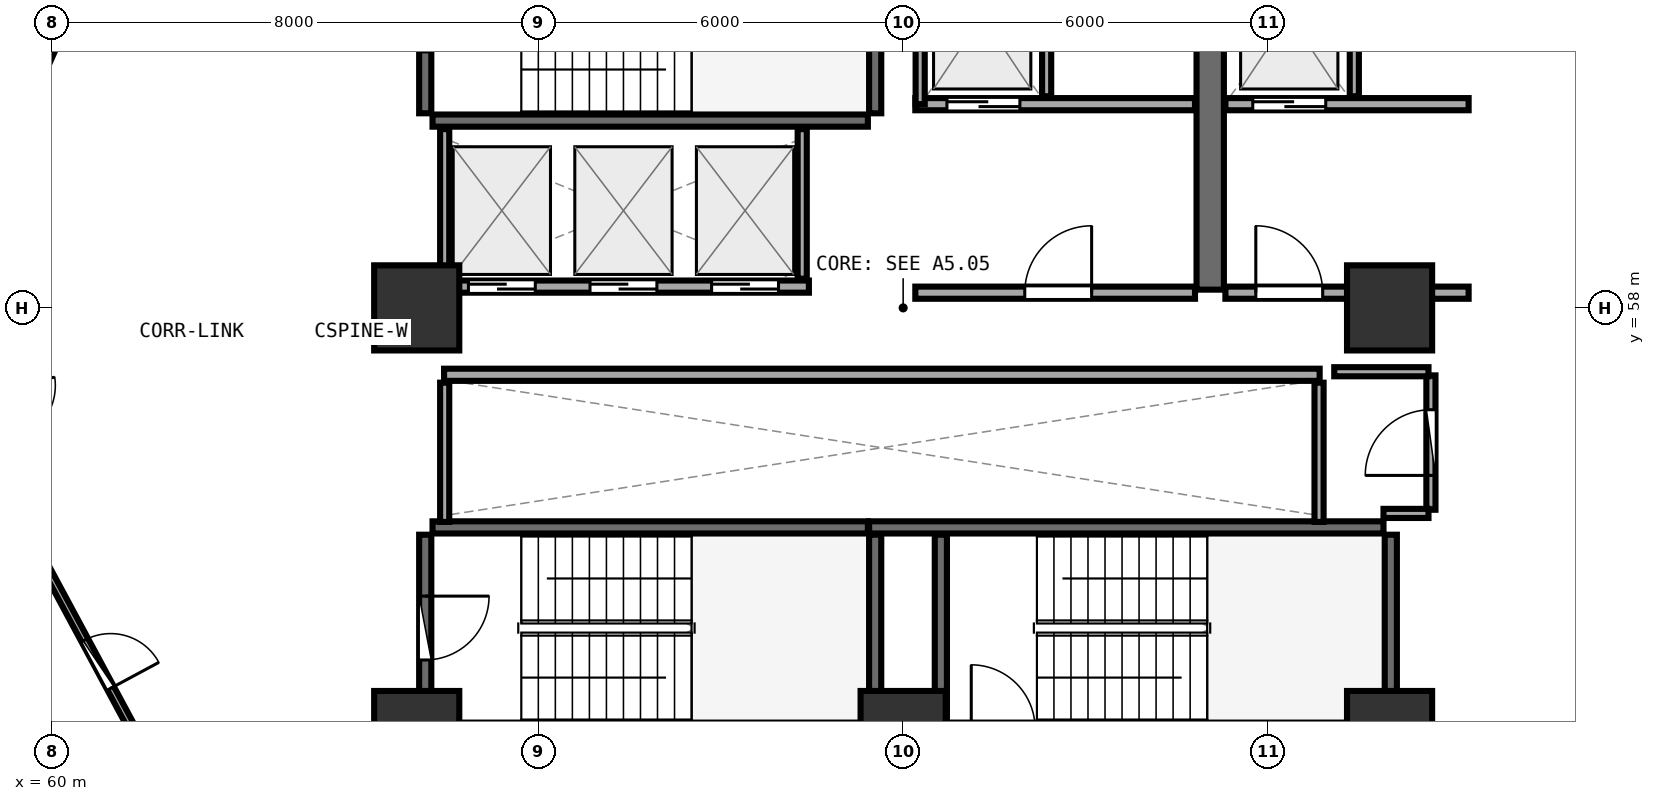
"""IFC4 building model, lengths in metres.
Left out: names, types, materials, properties, quantities, classifications, styles, units other than length and angle.
Written with IfcOpenShell. Run it as: python <this file> out.ifc"""

import sys

from ifc_helpers import new_model, si_unit, direction, frame, frame_2d, origin, origin_2d, place, context, subcontext, project, spatial, rectangle, extrude, element, fill, save


model = new_model("IFC4")
c1 = context("Model", 3, precision=1e-05, world=origin(), true_north=direction((0.0, 1.0)))
c2 = subcontext(c1, "Body", "Model", "MODEL_VIEW")
j1 = project(units=[si_unit("LENGTHUNIT", "METRE"), si_unit("PLANEANGLEUNIT", "RADIAN")], contexts=[c1])
p1 = place(None, origin())
s1 = spatial("IfcSite", under=j1, at=p1, CompositionType="ELEMENT")
p2 = place(p1, origin())
s2 = spatial("IfcBuilding", under=s1, at=p2, CompositionType="ELEMENT")
p3 = place(p2, frame((0.0, 0.0, 91.35)))
s3 = spatial("IfcBuildingStorey", under=s2, at=p3, CompositionType="ELEMENT", Elevation=91.35)
for number, where, z_axis, x_axis in (
    (1, (66.0, 51.0, 0.0), (0.0, 0.0, 1.0), (1.0, 0.0, 0.0)),
    (2, (74.0, 51.0, 0.0), (0.0, 0.0, 1.0), (1.0, 0.0, 0.0)),
    (3, (82.0, 51.0, 0.0), (0.0, 0.0, 1.0), (1.0, 0.0, 0.0)),
    (4, (82.0, 58.0, 0.0), (0.0, 0.0, 1.0), (1.0, 0.0, 0.0)),
    (5, (66.0, 58.0, 0.0), (0.0, 0.0, 1.0), (1.0, 0.0, 0.0)),
):
    element("IfcColumn", number, at=place(p3, frame(where, z_axis=z_axis, x_axis=x_axis)), inside=s3, PredefinedType="PILASTER", context=c2, shape_type="SweptSolid", body=[
        extrude(rectangle(XDim=1.4, YDim=1.4, at=origin_2d()), origin(), (0.0, 0.0, 1.0), 3.75),
    ])
p4 = place(p3, frame((66.26, 61.08, 0.0), z_axis=(0.0, 0.0, 1.0), x_axis=(1.0, 0.0, 0.0)))
e6 = element("IfcWall", 6, at=p4, inside=s3, PredefinedType="SHEAR", context=c2, shape_type="SweptSolid", body=[
    extrude(rectangle(XDim=7.16, YDim=0.2, at=frame_2d((3.58, 0.0))), origin(), (0.0, 0.0, 1.0), 3.49),
])
p5 = place(p3, frame((73.54, 61.2, 0.0), z_axis=(0.0, 0.0, 1.0), x_axis=(0.0, 1.0, 0.0)))
e7 = element("IfcWall", 7, at=p5, inside=s3, PredefinedType="SHEAR", context=c2, shape_type="SweptSolid", body=[
    extrude(rectangle(XDim=3.07, YDim=0.2, at=frame_2d((1.535, 0.0))), origin(), (0.0, 0.0, 1.0), 3.49),
])
p6 = place(p3, frame((66.14, 64.27, 0.0), z_axis=(0.0, 0.0, 1.0), x_axis=(0.0, -1.0, 0.0)))
e8 = element("IfcWall", 8, at=p6, inside=s3, PredefinedType="SHEAR", context=c2, shape_type="SweptSolid", body=[
    extrude(rectangle(XDim=3.07, YDim=0.2, at=frame_2d((1.535, 0.0))), origin(), (0.0, 0.0, 1.0), 3.49),
])
p7 = place(p6, frame((1.01, 0.0, 0.0)))
e9 = element("IfcOpeningElement", 9, at=p7, cuts=e8, PredefinedType="OPENING", context=c2, shape_type="SweptSolid", body=[
    extrude(rectangle(XDim=1.05, YDim=2.1, at=frame_2d((0.525, 1.05))), frame((0.0, 0.11, 0.0), z_axis=(0.0, -1.0, 0.0), x_axis=(1.0, 0.0, 0.0)), (0.0, 0.0, 1.0), 0.22),
])
p8 = place(p3, frame((82.02, 51.2, 0.0), z_axis=(0.0, 0.0, 1.0), x_axis=(0.0, 1.0, 0.0)))
e10 = element("IfcWall", 10, at=p8, inside=s3, PredefinedType="SHEAR", context=c2, shape_type="SweptSolid", body=[
    extrude(rectangle(XDim=3.07, YDim=0.2, at=frame_2d((1.535, 0.0))), origin(), (0.0, 0.0, 1.0), 3.49),
])
p9 = place(p3, frame((81.9, 54.39, 0.0), z_axis=(0.0, 0.0, 1.0), x_axis=(-1.0, 0.0, 0.0)))
e11 = element("IfcWall", 11, at=p9, inside=s3, PredefinedType="SHEAR", context=c2, shape_type="SweptSolid", body=[
    extrude(rectangle(XDim=8.46, YDim=0.2, at=frame_2d((4.23, 0.0))), origin(), (0.0, 0.0, 1.0), 3.49),
])
for number, where, z_axis, x_axis in (
    (12, (74.62, 54.27, 0.0), (0.0, 0.0, 1.0), (0.0, -1.0, 0.0)),
    (13, (73.54, 51.2, 0.0), (0.0, 0.0, 1.0), (0.0, 1.0, 0.0)),
):
    element("IfcWall", number, at=place(p3, frame(where, z_axis=z_axis, x_axis=x_axis)), inside=s3, PredefinedType="SHEAR", context=c2, shape_type="SweptSolid", body=[
        extrude(rectangle(XDim=3.07, YDim=0.2, at=frame_2d((1.535, 0.0))), origin(), (0.0, 0.0, 1.0), 3.49),
    ])
p10 = place(p3, frame((73.42, 54.39, 0.0), z_axis=(0.0, 0.0, 1.0), x_axis=(-1.0, 0.0, 0.0)))
e14 = element("IfcWall", 14, at=p10, inside=s3, PredefinedType="SHEAR", context=c2, shape_type="SweptSolid", body=[
    extrude(rectangle(XDim=7.16, YDim=0.2, at=frame_2d((3.58, 0.0))), origin(), (0.0, 0.0, 1.0), 3.49),
])
p11 = place(p3, frame((66.14, 54.27, 0.0), z_axis=(0.0, 0.0, 1.0), x_axis=(0.0, -1.0, 0.0)))
e15 = element("IfcWall", 15, at=p11, inside=s3, PredefinedType="SHEAR", context=c2, shape_type="SweptSolid", body=[
    extrude(rectangle(XDim=3.07, YDim=0.2, at=frame_2d((1.535, 0.0))), origin(), (0.0, 0.0, 1.0), 3.49),
])
p12 = place(p11, frame((1.01, 0.0, 0.0)))
e16 = element("IfcOpeningElement", 16, at=p12, cuts=e15, PredefinedType="OPENING", context=c2, shape_type="SweptSolid", body=[
    extrude(rectangle(XDim=1.05, YDim=2.1, at=frame_2d((0.525, 1.05))), frame((0.0, 0.11, 0.0), z_axis=(0.0, -1.0, 0.0), x_axis=(1.0, 0.0, 0.0)), (0.0, 0.0, 1.0), 0.22),
])
p13 = place(p3, frame((79.05, 58.3, 0.0), z_axis=(0.0, 0.0, 1.0), x_axis=(0.0, 1.0, 0.0)))
e17 = element("IfcWall", 17, at=p13, inside=s3, PredefinedType="SHEAR", context=c2, shape_type="SweptSolid", body=[
    extrude(rectangle(XDim=6.3, YDim=0.45, at=frame_2d((3.15, 0.0))), origin(), (0.0, 0.0, 1.0), 3.49),
])
p14 = place(p3, frame((74.2, 61.35, 0.0), z_axis=(0.0, 0.0, 1.0), x_axis=(1.0, 0.0, 0.0)))
e18 = element("IfcWall", 18, at=p14, inside=s3, PredefinedType="SOLIDWALL", context=c2, shape_type="SweptSolid", body=[
    extrude(rectangle(XDim=4.6, YDim=0.2, at=frame_2d((2.3, 0.0))), origin(), (0.0, 0.0, 1.0), 3.48),
])
p15 = place(p14, frame((0.52, 0.0, 0.0)))
e19 = element("IfcOpeningElement", 19, at=p15, cuts=e18, PredefinedType="OPENING", context=c2, shape_type="SweptSolid", body=[
    extrude(rectangle(XDim=1.2, YDim=2.15, at=frame_2d((0.6, 1.075))), frame((0.0, 0.11, 0.0), z_axis=(0.0, -1.0, 0.0), x_axis=(1.0, 0.0, 0.0)), (0.0, 0.0, 1.0), 0.22),
])
p16 = place(p3, frame((74.28, 61.35, 0.0), z_axis=(0.0, 0.0, 1.0), x_axis=(0.0, 1.0, 0.0)))
e20 = element("IfcWall", 20, at=p16, inside=s3, PredefinedType="PARTITIONING", context=c2, shape_type="SweptSolid", body=[
    extrude(rectangle(XDim=2.97, YDim=0.15, at=frame_2d((1.485, 0.0))), origin(), (0.0, 0.0, 1.0), 3.48),
])
p17 = place(p3, frame((76.36, 61.48, 0.0), z_axis=(0.0, 0.0, 1.0), x_axis=(0.0, 1.0, 0.0)))
e21 = element("IfcWall", 21, at=p17, inside=s3, PredefinedType="PARTITIONING", context=c2, shape_type="SweptSolid", body=[
    extrude(rectangle(XDim=2.84, YDim=0.15, at=frame_2d((1.42, 0.0))), origin(), (0.0, 0.0, 1.0), 3.48),
])
p18 = place(p3, frame((79.3, 61.35, 0.0), z_axis=(0.0, 0.0, 1.0), x_axis=(1.0, 0.0, 0.0)))
e22 = element("IfcWall", 22, at=p18, inside=s3, PredefinedType="SOLIDWALL", context=c2, shape_type="SweptSolid", body=[
    extrude(rectangle(XDim=4.0, YDim=0.2, at=frame_2d((2.0, 0.0))), origin(), (0.0, 0.0, 1.0), 2.775),
])
p19 = place(p18, frame((0.45, 0.0, 0.0)))
e23 = element("IfcOpeningElement", 23, at=p19, cuts=e22, PredefinedType="OPENING", context=c2, shape_type="SweptSolid", body=[
    extrude(rectangle(XDim=1.2, YDim=2.15, at=frame_2d((0.6, 1.075))), frame((0.0, 0.11, 0.0), z_axis=(0.0, -1.0, 0.0), x_axis=(1.0, 0.0, 0.0)), (0.0, 0.0, 1.0), 0.22),
])
p20 = place(p3, frame((81.42, 61.48, 0.0), z_axis=(0.0, 0.0, 1.0), x_axis=(0.0, 1.0, 0.0)))
e24 = element("IfcWall", 24, at=p20, inside=s3, PredefinedType="PARTITIONING", context=c2, shape_type="SweptSolid", body=[
    extrude(rectangle(XDim=2.84, YDim=0.15, at=frame_2d((1.42, 0.0))), origin(), (0.0, 0.0, 1.0), 3.48),
])
p21 = place(p3, frame((74.2, 58.25, 0.0), z_axis=(0.0, 0.0, 1.0), x_axis=(1.0, 0.0, 0.0)))
e25 = element("IfcWall", 25, at=p21, inside=s3, PredefinedType="SOLIDWALL", context=c2, shape_type="SweptSolid", body=[
    extrude(rectangle(XDim=4.6, YDim=0.2, at=frame_2d((2.3, 0.0))), origin(), (0.0, 0.0, 1.0), 3.48),
])
p22 = place(p21, frame((1.8, 0.0, 0.0)))
e26 = element("IfcOpeningElement", 26, at=p22, cuts=e25, PredefinedType="OPENING", context=c2, shape_type="SweptSolid", body=[
    extrude(rectangle(XDim=1.1, YDim=2.1, at=frame_2d((0.55, 1.05))), frame((0.0, 0.11, 0.0), z_axis=(0.0, -1.0, 0.0), x_axis=(1.0, 0.0, 0.0)), (0.0, 0.0, 1.0), 0.22),
])
p23 = place(p3, frame((79.3, 58.25, 0.0), z_axis=(0.0, 0.0, 1.0), x_axis=(1.0, 0.0, 0.0)))
e27 = element("IfcWall", 27, at=p23, inside=s3, PredefinedType="SOLIDWALL", context=c2, shape_type="SweptSolid", body=[
    extrude(rectangle(XDim=4.0, YDim=0.2, at=frame_2d((2.0, 0.0))), origin(), (0.0, 0.0, 1.0), 2.775),
])
p24 = place(p23, frame((0.5, 0.0, 0.0)))
e28 = element("IfcOpeningElement", 28, at=p24, cuts=e27, PredefinedType="OPENING", context=c2, shape_type="SweptSolid", body=[
    extrude(rectangle(XDim=1.1, YDim=2.1, at=frame_2d((0.55, 1.05))), frame((0.0, 0.11, 0.0), z_axis=(0.0, -1.0, 0.0), x_axis=(1.0, 0.0, 0.0)), (0.0, 0.0, 1.0), 0.22),
])
p25 = place(p3, frame((66.45, 58.35, 0.0), z_axis=(0.0, 0.0, 1.0), x_axis=(1.0, 0.0, 0.0)))
e29 = element("IfcWall", 29, at=p25, inside=s3, PredefinedType="SOLIDWALL", context=c2, shape_type="SweptSolid", body=[
    extrude(rectangle(XDim=6.0, YDim=0.2, at=frame_2d((3.0, 0.0))), origin(), (0.0, 0.0, 1.0), 3.48),
])
p26 = place(p25, frame((0.4, 0.0, 0.0)))
e30 = element("IfcOpeningElement", 30, at=p26, cuts=e29, PredefinedType="OPENING", context=c2, shape_type="SweptSolid", body=[
    extrude(rectangle(XDim=1.1, YDim=2.1, at=frame_2d((0.55, 1.05))), frame((0.0, 0.11, 0.0), z_axis=(0.0, -1.0, 0.0), x_axis=(1.0, 0.0, 0.0)), (0.0, 0.0, 1.0), 0.22),
])
p27 = place(p25, frame((2.4, 0.0, 0.0)))
e31 = element("IfcOpeningElement", 31, at=p27, cuts=e29, PredefinedType="OPENING", context=c2, shape_type="SweptSolid", body=[
    extrude(rectangle(XDim=1.1, YDim=2.1, at=frame_2d((0.55, 1.05))), frame((0.0, 0.11, 0.0), z_axis=(0.0, -1.0, 0.0), x_axis=(1.0, 0.0, 0.0)), (0.0, 0.0, 1.0), 0.22),
])
p28 = place(p25, frame((4.4, 0.0, 0.0)))
e32 = element("IfcOpeningElement", 32, at=p28, cuts=e29, PredefinedType="OPENING", context=c2, shape_type="SweptSolid", body=[
    extrude(rectangle(XDim=1.1, YDim=2.1, at=frame_2d((0.55, 1.05))), frame((0.0, 0.11, 0.0), z_axis=(0.0, -1.0, 0.0), x_axis=(1.0, 0.0, 0.0)), (0.0, 0.0, 1.0), 0.22),
])
for number, where, z_axis, x_axis in (
    (33, (66.46, 58.48, 0.0), (0.0, 0.0, 1.0), (0.0, 1.0, 0.0)),
    (34, (72.34, 58.48, 0.0), (0.0, 0.0, 1.0), (0.0, 1.0, 0.0)),
):
    element("IfcWall", number, at=place(p3, frame(where, z_axis=z_axis, x_axis=x_axis)), inside=s3, PredefinedType="PARTITIONING", context=c2, shape_type="SweptSolid", body=[
        extrude(rectangle(XDim=2.46, YDim=0.15, at=frame_2d((1.23, 0.0))), origin(), (0.0, 0.0, 1.0), 3.48),
    ])
p29 = place(p3, frame((66.45, 56.9, 0.0), z_axis=(0.0, 0.0, 1.0), x_axis=(1.0, 0.0, 0.0)))
e35 = element("IfcWall", 35, at=p29, inside=s3, PredefinedType="SOLIDWALL", context=c2, shape_type="SweptSolid", body=[
    extrude(rectangle(XDim=14.4, YDim=0.2, at=frame_2d((7.2, 0.0))), origin(), (0.0, 0.0, 1.0), 3.48),
])
for number, where, z_axis, x_axis in (
    (36, (66.46, 54.48, 0.0), (0.0, 0.0, 1.0), (0.0, 1.0, 0.0)),
    (37, (80.84, 54.48, 0.0), (0.0, 0.0, 1.0), (0.0, 1.0, 0.0)),
):
    element("IfcWall", number, at=place(p3, frame(where, z_axis=z_axis, x_axis=x_axis)), inside=s3, PredefinedType="PARTITIONING", context=c2, shape_type="SweptSolid", body=[
        extrude(rectangle(XDim=2.29, YDim=0.15, at=frame_2d((1.145, 0.0))), origin(), (0.0, 0.0, 1.0), 3.48),
    ])
p30 = place(p3, frame((82.68, 54.68, 0.0), z_axis=(0.0, 0.0, 1.0), x_axis=(0.0, 1.0, 0.0)))
e38 = element("IfcWall", 38, at=p30, inside=s3, PredefinedType="PARTITIONING", context=c2, shape_type="SweptSolid", body=[
    extrude(rectangle(XDim=2.21, YDim=0.15, at=frame_2d((1.105, 0.0))), origin(), (0.0, 0.0, 1.0), 3.48),
])
p31 = place(p30, frame((0.565, 0.0, 0.0)))
e39 = element("IfcOpeningElement", 39, at=p31, cuts=e38, PredefinedType="OPENING", context=c2, shape_type="SweptSolid", body=[
    extrude(rectangle(XDim=1.08, YDim=2.1, at=frame_2d((0.54, 1.05))), frame((0.0, 0.085, 0.0), z_axis=(0.0, -1.0, 0.0), x_axis=(1.0, 0.0, 0.0)), (0.0, 0.0, 1.0), 0.17),
])
p32 = place(p3, frame((61.414, 65.428, 0.0), z_axis=(0.0, 0.0, 1.0), x_axis=(-0.407078232177, -0.913393295841, 0.0)))
e40 = element("IfcWall", 40, at=p32, inside=s3, PredefinedType="PARTITIONING", context=c2, shape_type="SweptSolid", body=[
    extrude(rectangle(XDim=5.302, YDim=0.12, at=frame_2d((2.651, 0.0))), origin(), (0.0, 0.0, 1.0), 2.925),
])
p33 = place(p32, frame((2.201, 0.0, 0.0)))
e41 = element("IfcOpeningElement", 41, at=p33, cuts=e40, PredefinedType="OPENING", context=c2, shape_type="SweptSolid", body=[
    extrude(rectangle(XDim=0.9, YDim=2.08, at=frame_2d((0.45, 1.04))), frame((0.0, 0.07, 0.0), z_axis=(0.0, -1.0, 0.0), x_axis=(1.0, 0.0, 0.0)), (0.0, 0.0, 1.0), 0.14),
])
p34 = place(p3, frame((59.49, 54.488, 0.0), z_axis=(0.0, 0.0, 1.0), x_axis=(0.473630069111, -0.880723882743, 0.0)))
e42 = element("IfcWall", 42, at=p34, inside=s3, PredefinedType="PARTITIONING", context=c2, shape_type="SweptSolid", body=[
    extrude(rectangle(XDim=5.332, YDim=0.12, at=frame_2d((2.666, 0.0))), origin(), (0.0, 0.0, 1.0), 2.925),
])
p35 = place(p34, frame((2.216, 0.0, 0.0)))
e43 = element("IfcOpeningElement", 43, at=p35, cuts=e42, PredefinedType="OPENING", context=c2, shape_type="SweptSolid", body=[
    extrude(rectangle(XDim=0.9, YDim=2.08, at=frame_2d((0.45, 1.04))), frame((0.0, 0.07, 0.0), z_axis=(0.0, -1.0, 0.0), x_axis=(1.0, 0.0, 0.0)), (0.0, 0.0, 1.0), 0.14),
])
p36 = place(p3, frame((84.608, 48.36, 0.0), z_axis=(0.0, 0.0, 1.0), x_axis=(0.596833425992, 0.802365167251, 0.0)))
e44 = element("IfcWall", 44, at=p36, inside=s3, PredefinedType="PARTITIONING", context=c2, shape_type="SweptSolid", body=[
    extrude(rectangle(XDim=5.399, YDim=0.12, at=frame_2d((2.699, 0.0))), origin(), (0.0, 0.0, 1.0), 2.925),
])
p37 = place(p36, frame((2.249, 0.0, 0.0)))
e45 = element("IfcOpeningElement", 45, at=p37, cuts=e44, PredefinedType="OPENING", context=c2, shape_type="SweptSolid", body=[
    extrude(rectangle(XDim=0.9, YDim=2.08, at=frame_2d((0.45, 1.04))), frame((0.0, 0.07, 0.0), z_axis=(0.0, -1.0, 0.0), x_axis=(1.0, 0.0, 0.0)), (0.0, 0.0, 1.0), 0.14),
])
p38 = place(p3, frame((81.9, 54.62, 0.0), z_axis=(0.0, 0.0, 1.0), x_axis=(1.0, 0.0, 0.0)))
e46 = element("IfcWall", 46, at=p38, inside=s3, PredefinedType="PARTITIONING", context=c2, shape_type="SweptSolid", body=[
    extrude(rectangle(XDim=0.74, YDim=0.15, at=frame_2d((0.37, 0.0))), origin(), (0.0, 0.0, 1.0), 2.775),
])
p39 = place(p3, frame((82.64, 56.95, 0.0), z_axis=(0.0, 0.0, 1.0), x_axis=(-1.0, 0.0, 0.0)))
e47 = element("IfcWall", 47, at=p39, inside=s3, PredefinedType="PARTITIONING", context=c2, shape_type="SweptSolid", body=[
    extrude(rectangle(XDim=1.55, YDim=0.15, at=frame_2d((0.775, 0.0))), origin(), (0.0, 0.0, 1.0), 2.775),
])
p40 = place(p12, origin())
e48 = element("IfcDoor", 48, at=p40, inside=s3, OperationType="SINGLE_SWING_LEFT", PredefinedType="DOOR", context=c2, shape_type="SweptSolid", body=[
    extrude(rectangle(XDim=1.05, YDim=2.1, at=frame_2d((0.525, 1.05))), frame((0.0, 0.025, 0.0), z_axis=(0.0, -1.0, 0.0), x_axis=(1.0, 0.0, 0.0)), (0.0, 0.0, 1.0), 0.05),
])
fill(e16, e48)
p41 = place(p15, origin())
e49 = element("IfcDoor", 49, at=p41, inside=s3, OperationType="DOUBLE_DOOR_SLIDING", PredefinedType="DOOR", context=c2, shape_type="SweptSolid", body=[
    extrude(rectangle(XDim=1.2, YDim=2.15, at=frame_2d((0.6, 1.075))), frame((0.0, 0.025, 0.0), z_axis=(0.0, -1.0, 0.0), x_axis=(1.0, 0.0, 0.0)), (0.0, 0.0, 1.0), 0.05),
])
fill(e19, e49)
p42 = place(p19, origin())
e50 = element("IfcDoor", 50, at=p42, inside=s3, OperationType="DOUBLE_DOOR_SLIDING", PredefinedType="DOOR", context=c2, shape_type="SweptSolid", body=[
    extrude(rectangle(XDim=1.2, YDim=2.15, at=frame_2d((0.6, 1.075))), frame((0.0, 0.025, 0.0), z_axis=(0.0, -1.0, 0.0), x_axis=(1.0, 0.0, 0.0)), (0.0, 0.0, 1.0), 0.05),
])
fill(e23, e50)
p43 = place(p22, frame((1.1, 0.0, 0.0), z_axis=(0.0, 0.0, 1.0), x_axis=(-1.0, 0.0, 0.0)))
e51 = element("IfcDoor", 51, at=p43, inside=s3, OperationType="SINGLE_SWING_LEFT", PredefinedType="DOOR", context=c2, shape_type="SweptSolid", body=[
    extrude(rectangle(XDim=1.1, YDim=2.1, at=frame_2d((0.55, 1.05))), frame((0.0, 0.025, 0.0), z_axis=(0.0, -1.0, 0.0), x_axis=(1.0, 0.0, 0.0)), (0.0, 0.0, 1.0), 0.05),
])
fill(e26, e51)
p44 = place(p24, frame((1.1, 0.0, 0.0), z_axis=(0.0, 0.0, 1.0), x_axis=(-1.0, 0.0, 0.0)))
e52 = element("IfcDoor", 52, at=p44, inside=s3, OperationType="SINGLE_SWING_RIGHT", PredefinedType="DOOR", context=c2, shape_type="SweptSolid", body=[
    extrude(rectangle(XDim=1.1, YDim=2.1, at=frame_2d((0.55, 1.05))), frame((0.0, 0.025, 0.0), z_axis=(0.0, -1.0, 0.0), x_axis=(1.0, 0.0, 0.0)), (0.0, 0.0, 1.0), 0.05),
])
fill(e28, e52)
p45 = place(p26, origin())
e53 = element("IfcDoor", 53, at=p45, inside=s3, OperationType="DOUBLE_DOOR_SLIDING", PredefinedType="DOOR", context=c2, shape_type="SweptSolid", body=[
    extrude(rectangle(XDim=1.1, YDim=2.1, at=frame_2d((0.55, 1.05))), frame((0.0, 0.025, 0.0), z_axis=(0.0, -1.0, 0.0), x_axis=(1.0, 0.0, 0.0)), (0.0, 0.0, 1.0), 0.05),
])
fill(e30, e53)
p46 = place(p27, origin())
e54 = element("IfcDoor", 54, at=p46, inside=s3, OperationType="DOUBLE_DOOR_SLIDING", PredefinedType="DOOR", context=c2, shape_type="SweptSolid", body=[
    extrude(rectangle(XDim=1.1, YDim=2.1, at=frame_2d((0.55, 1.05))), frame((0.0, 0.025, 0.0), z_axis=(0.0, -1.0, 0.0), x_axis=(1.0, 0.0, 0.0)), (0.0, 0.0, 1.0), 0.05),
])
fill(e31, e54)
p47 = place(p28, origin())
e55 = element("IfcDoor", 55, at=p47, inside=s3, OperationType="DOUBLE_DOOR_SLIDING", PredefinedType="DOOR", context=c2, shape_type="SweptSolid", body=[
    extrude(rectangle(XDim=1.1, YDim=2.1, at=frame_2d((0.55, 1.05))), frame((0.0, 0.025, 0.0), z_axis=(0.0, -1.0, 0.0), x_axis=(1.0, 0.0, 0.0)), (0.0, 0.0, 1.0), 0.05),
])
fill(e32, e55)
p48 = place(p31, origin())
e56 = element("IfcDoor", 56, at=p48, inside=s3, OperationType="SINGLE_SWING_LEFT", PredefinedType="DOOR", context=c2, shape_type="SweptSolid", body=[
    extrude(rectangle(XDim=1.08, YDim=2.1, at=frame_2d((0.54, 1.05))), frame((0.0, 0.025, 0.0), z_axis=(0.0, -1.0, 0.0), x_axis=(1.0, 0.0, 0.0)), (0.0, 0.0, 1.0), 0.05),
])
fill(e39, e56)
p49 = place(p35, origin())
e57 = element("IfcDoor", 57, at=p49, inside=s3, OperationType="SINGLE_SWING_RIGHT", PredefinedType="DOOR", context=c2, shape_type="SweptSolid", body=[
    extrude(rectangle(XDim=0.9, YDim=2.08, at=frame_2d((0.45, 1.04))), frame((0.0, 0.025, 0.0), z_axis=(0.0, -1.0, 0.0), x_axis=(1.0, 0.0, 0.0)), (0.0, 0.0, 1.0), 0.05),
])
fill(e43, e57)
save(model, sys.argv[1])
